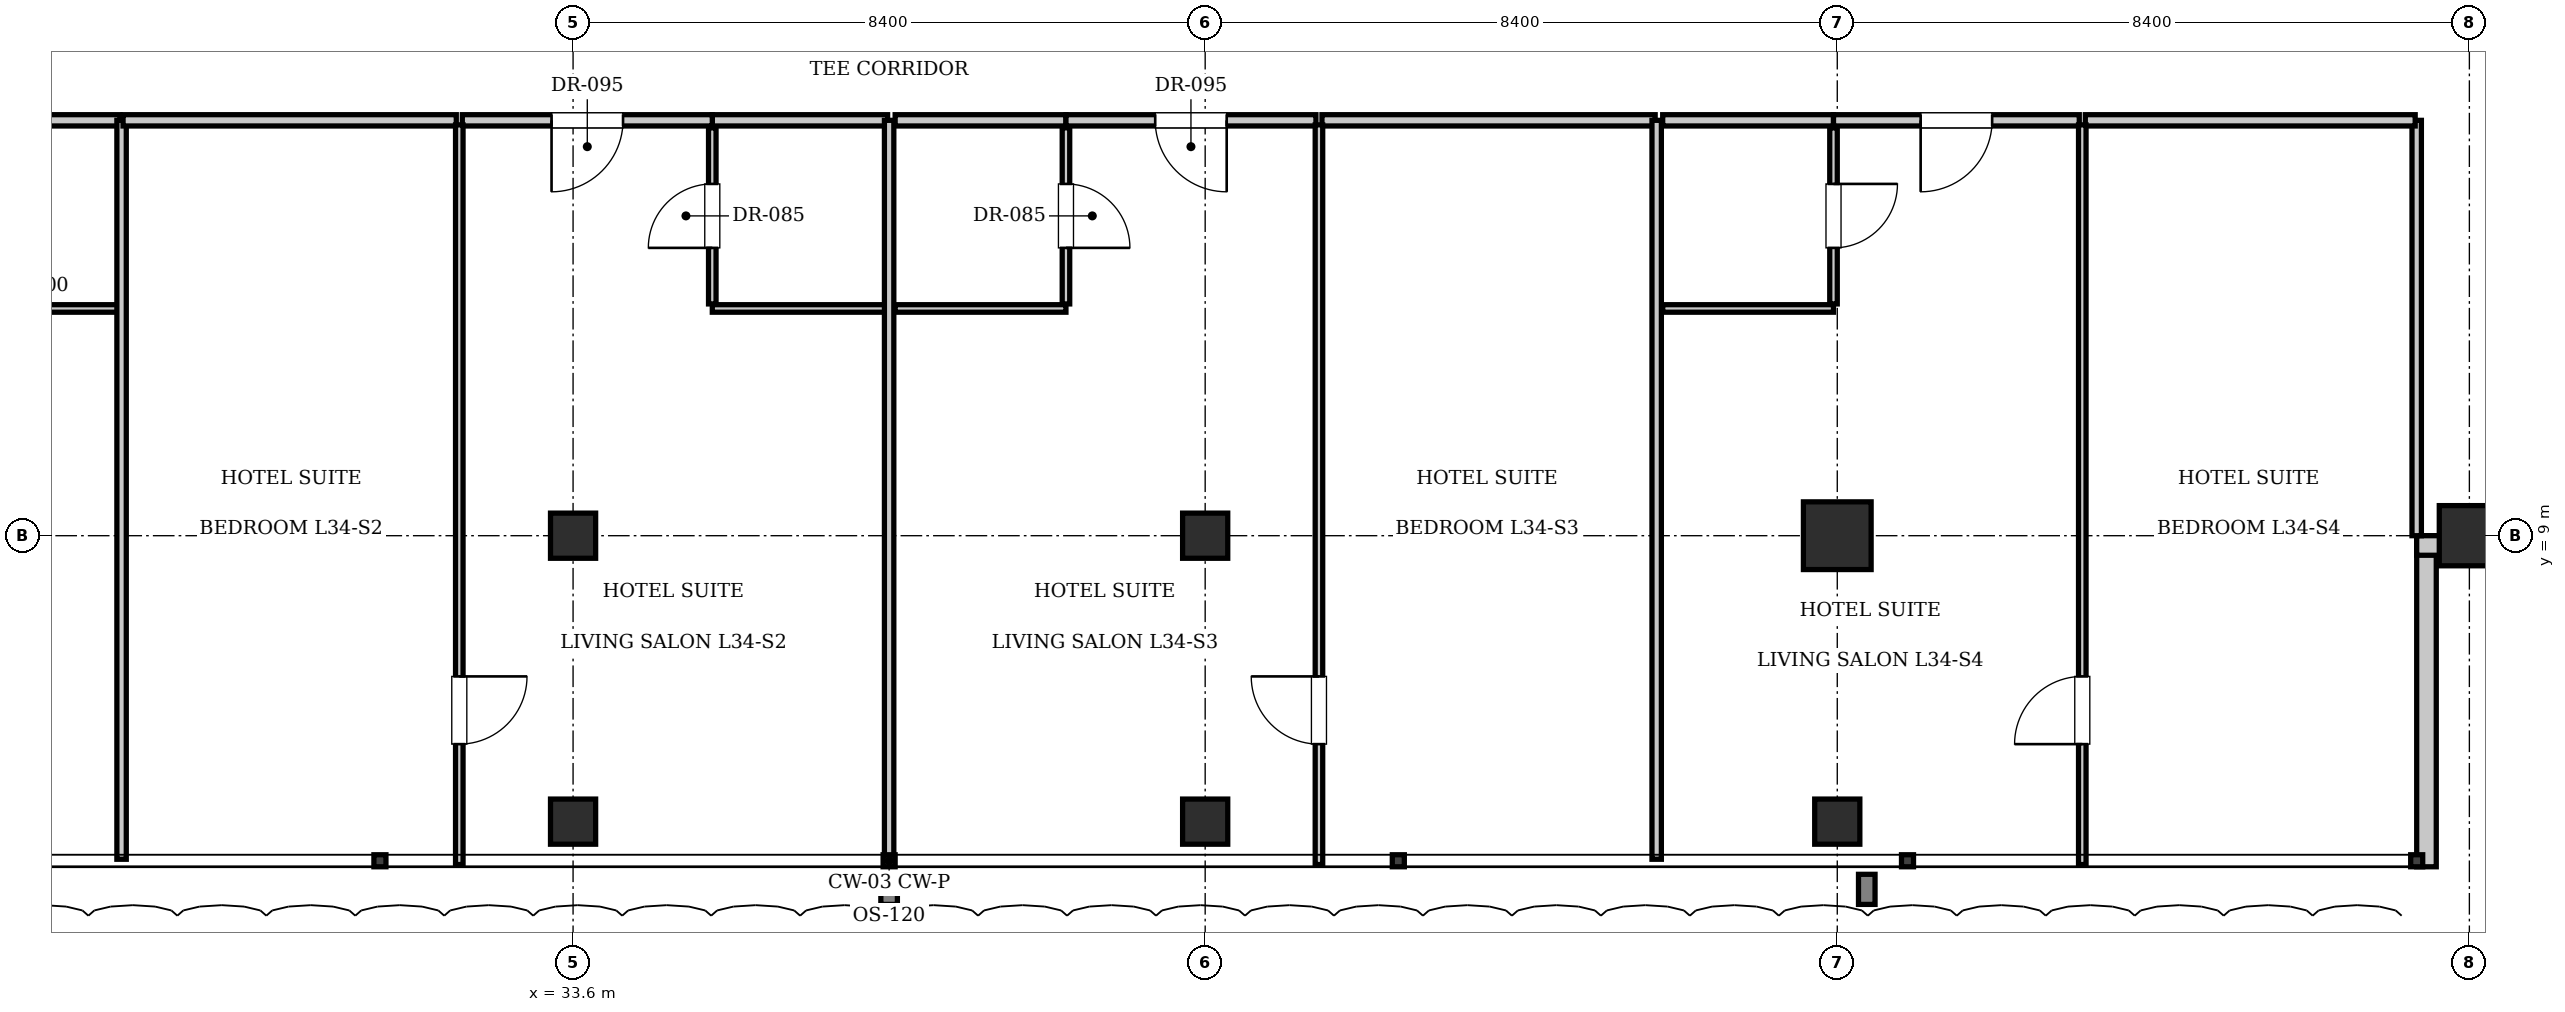
"""IFC4 building model, lengths in metres.
Left out: names, types, materials, properties, quantities, classifications, styles, units other than length and angle.
Written with IfcOpenShell. Run it as: python <this file> out.ifc"""

import sys

from ifc_helpers import new_model, si_unit, direction, frame, frame_2d, origin, origin_2d, place, context, subcontext, project, spatial, rectangle, i_section, extrude, element, fill, save


model = new_model("IFC4")
c1 = context("Model", 3, precision=1e-05, world=origin(), true_north=direction((0.0, 1.0)))
c2 = subcontext(c1, "Body", "Model", "MODEL_VIEW")
j1 = project(units=[si_unit("LENGTHUNIT", "METRE"), si_unit("PLANEANGLEUNIT", "RADIAN")], contexts=[c1])
p1 = place(None, origin())
s1 = spatial("IfcSite", under=j1, at=p1, CompositionType="ELEMENT")
p2 = place(p1, origin())
s2 = spatial("IfcBuilding", under=s1, at=p2, CompositionType="ELEMENT")
p3 = place(p2, frame((0.0, 0.0, 142.8)))
s3 = spatial("IfcBuildingStorey", under=s2, at=p3, CompositionType="ELEMENT", Elevation=142.8)
p4 = place(p3, frame((50.4, 9.0, 0.0), z_axis=(0.0, 0.0, 1.0), x_axis=(1.0, 0.0, 0.0)))
e1 = element("IfcColumn", 1, at=p4, inside=s3, PredefinedType="COLUMN", context=c2, shape_type="SweptSolid", body=[
    extrude(rectangle(XDim=0.9, YDim=0.9, at=origin_2d()), origin(), (0.0, 0.0, 1.0), 3.85),
])
for number, where, z_axis, x_axis in (
    (2, (33.6, 9.0, 0.0), (0.0, 0.0, 1.0), (1.0, 0.0, 0.0)),
    (3, (42.0, 9.0, 0.0), (0.0, 0.0, 1.0), (1.0, 0.0, 0.0)),
):
    element("IfcColumn", number, at=place(p3, frame(where, z_axis=z_axis, x_axis=x_axis)), inside=s3, PredefinedType="COLUMN", context=c2, shape_type="SweptSolid", body=[
        extrude(i_section(OverallWidth=0.6, OverallDepth=0.6, WebThickness=0.025, FlangeThickness=0.038, at=origin_2d()), origin(), (0.0, 0.0, 1.0), 3.85),
    ])
p5 = place(p3, frame((58.8, 9.0, 0.0), z_axis=(0.0, 0.0, 1.0), x_axis=(1.0, 0.0, 0.0)))
e4 = element("IfcColumn", 4, at=p5, inside=s3, PredefinedType="COLUMN", context=c2, shape_type="SweptSolid", body=[
    extrude(rectangle(XDim=0.8, YDim=0.8, at=origin_2d()), origin(), (0.0, 0.0, 1.0), 3.85),
])
for number, where, z_axis, x_axis in (
    (5, (33.6, 5.2, 0.0), (0.0, 0.0, 1.0), (1.0, 0.0, 0.0)),
    (6, (42.0, 5.2, 0.0), (0.0, 0.0, 1.0), (1.0, 0.0, 0.0)),
    (7, (50.4, 5.2, 0.0), (0.0, 0.0, 1.0), (1.0, 0.0, 0.0)),
):
    element("IfcColumn", number, at=place(p3, frame(where, z_axis=z_axis, x_axis=x_axis)), inside=s3, PredefinedType="COLUMN", context=c2, shape_type="SweptSolid", body=[
        extrude(i_section(OverallWidth=0.6, OverallDepth=0.6, WebThickness=0.025, FlangeThickness=0.038, at=origin_2d()), origin(), (0.0, 0.0, 1.0), 3.85),
    ])
p6 = place(p3, frame((58.23, 9.0, 0.0), z_axis=(0.0, 0.0, 1.0), x_axis=(0.0, -1.0, 0.0)))
e8 = element("IfcWall", 8, at=p6, inside=s3, PredefinedType="SOLIDWALL", context=c2, shape_type="SweptSolid", body=[
    extrude(rectangle(XDim=4.4, YDim=0.26, at=frame_2d((2.2, 0.0))), origin(), (0.0, 0.0, 1.0), 3.61),
])
p7 = place(p3, frame((62.5, 8.87, 0.0), z_axis=(0.0, 0.0, 1.0), x_axis=(-1.0, 0.0, 0.0)))
e9 = element("IfcWall", 9, at=p7, inside=s3, PredefinedType="SOLIDWALL", context=c2, shape_type="SweptSolid", body=[
    extrude(rectangle(XDim=4.4, YDim=0.26, at=frame_2d((2.2, 0.0))), origin(), (0.0, 0.0, 1.0), 2.998),
])
p8 = place(p3, frame((58.1, 9.0, 0.0), z_axis=(0.0, 0.0, 1.0), x_axis=(0.0, 1.0, 0.0)))
e10 = element("IfcWall", 10, at=p8, inside=s3, PredefinedType="PARTITIONING", context=c2, shape_type="SweptSolid", body=[
    extrude(rectangle(XDim=5.52, YDim=0.125, at=frame_2d((2.76, 0.0))), origin(), (0.0, 0.0, 1.0), 3.61),
])
p9 = place(p3, frame((25.25, 14.52, 0.0), z_axis=(0.0, 0.0, 1.0), x_axis=(1.0, 0.0, 0.0)))
e11 = element("IfcWall", 11, at=p9, inside=s3, PredefinedType="PARTITIONING", context=c2, shape_type="SweptSolid", body=[
    extrude(rectangle(XDim=2.33, YDim=0.15, at=frame_2d((1.165, 0.0))), origin(), (0.0, 0.0, 1.0), 3.61),
])
p10 = place(p3, frame((25.25, 12.02, 0.0), z_axis=(0.0, 0.0, 1.0), x_axis=(1.0, 0.0, 0.0)))
e12 = element("IfcWall", 12, at=p10, inside=s3, PredefinedType="PARTITIONING", context=c2, shape_type="SweptSolid", body=[
    extrude(rectangle(XDim=2.31, YDim=0.1, at=frame_2d((1.155, 0.0))), origin(), (0.0, 0.0, 1.0), 3.61),
])
p11 = place(p3, frame((27.6, 4.7, 0.0), z_axis=(0.0, 0.0, 1.0), x_axis=(0.0, 1.0, 0.0)))
e13 = element("IfcWall", 13, at=p11, inside=s3, PredefinedType="PARTITIONING", context=c2, shape_type="SweptSolid", body=[
    extrude(rectangle(XDim=9.82, YDim=0.125, at=frame_2d((4.91, 0.0))), origin(), (0.0, 0.0, 1.0), 3.61),
])
p12 = place(p3, frame((35.45, 14.52, 0.0), z_axis=(0.0, 0.0, 1.0), x_axis=(1.0, 0.0, 0.0)))
e14 = element("IfcWall", 14, at=p12, inside=s3, PredefinedType="PARTITIONING", context=c2, shape_type="SweptSolid", body=[
    extrude(rectangle(XDim=2.33, YDim=0.15, at=frame_2d((1.165, 0.0))), origin(), (0.0, 0.0, 1.0), 3.61),
])
p13 = place(p3, frame((35.45, 12.02, 0.0), z_axis=(0.0, 0.0, 1.0), x_axis=(1.0, 0.0, 0.0)))
e15 = element("IfcWall", 15, at=p13, inside=s3, PredefinedType="PARTITIONING", context=c2, shape_type="SweptSolid", body=[
    extrude(rectangle(XDim=2.31, YDim=0.1, at=frame_2d((1.155, 0.0))), origin(), (0.0, 0.0, 1.0), 3.61),
])
p14 = place(p3, frame((35.45, 12.08, 0.0), z_axis=(0.0, 0.0, 1.0), x_axis=(0.0, 1.0, 0.0)))
e16 = element("IfcWall", 16, at=p14, inside=s3, PredefinedType="PARTITIONING", context=c2, shape_type="SweptSolid", body=[
    extrude(rectangle(XDim=2.34, YDim=0.1, at=frame_2d((1.17, 0.0))), origin(), (0.0, 0.0, 1.0), 3.61),
])
p15 = place(p14, frame((0.745, 0.0, 0.0)))
e17 = element("IfcOpeningElement", 17, at=p15, cuts=e16, PredefinedType="OPENING", context=c2, shape_type="SweptSolid", body=[
    extrude(rectangle(XDim=0.85, YDim=2.1, at=frame_2d((0.425, 1.05))), frame((0.0, 0.06, 0.0), z_axis=(0.0, -1.0, 0.0), x_axis=(1.0, 0.0, 0.0)), (0.0, 0.0, 1.0), 0.12),
])
p16 = place(p3, frame((27.62, 14.52, 0.0), z_axis=(0.0, 0.0, 1.0), x_axis=(1.0, 0.0, 0.0)))
e18 = element("IfcWall", 18, at=p16, inside=s3, PredefinedType="PARTITIONING", context=c2, shape_type="SweptSolid", body=[
    extrude(rectangle(XDim=4.428, YDim=0.15, at=frame_2d((2.214, 0.0))), origin(), (0.0, 0.0, 1.0), 3.61),
])
p17 = place(p3, frame((32.128, 14.52, 0.0), z_axis=(0.0, 0.0, 1.0), x_axis=(1.0, 0.0, 0.0)))
e19 = element("IfcWall", 19, at=p17, inside=s3, PredefinedType="PARTITIONING", context=c2, shape_type="SweptSolid", body=[
    extrude(rectangle(XDim=3.322, YDim=0.15, at=frame_2d((1.661, 0.0))), origin(), (0.0, 0.0, 1.0), 3.61),
])
p18 = place(p17, frame((1.186, 0.0, 0.0)))
e20 = element("IfcOpeningElement", 20, at=p18, cuts=e19, PredefinedType="OPENING", context=c2, shape_type="SweptSolid", body=[
    extrude(rectangle(XDim=0.95, YDim=2.15, at=frame_2d((0.475, 1.075))), frame((0.0, 0.085, 0.0), z_axis=(0.0, -1.0, 0.0), x_axis=(1.0, 0.0, 0.0)), (0.0, 0.0, 1.0), 0.17),
])
p19 = place(p3, frame((32.088, 4.63, 0.0), z_axis=(0.0, 0.0, 1.0), x_axis=(0.0, 1.0, 0.0)))
e21 = element("IfcWall", 21, at=p19, inside=s3, PredefinedType="PARTITIONING", context=c2, shape_type="SweptSolid", body=[
    extrude(rectangle(XDim=9.83, YDim=0.1, at=frame_2d((4.915, 0.0))), origin(), (0.0, 0.0, 1.0), 3.61),
])
p20 = place(p19, frame((1.6, 0.0, 0.0)))
e22 = element("IfcOpeningElement", 22, at=p20, cuts=e21, PredefinedType="OPENING", context=c2, shape_type="SweptSolid", body=[
    extrude(rectangle(XDim=0.9, YDim=2.1, at=frame_2d((0.45, 1.05))), frame((0.0, 0.06, 0.0), z_axis=(0.0, -1.0, 0.0), x_axis=(1.0, 0.0, 0.0)), (0.0, 0.0, 1.0), 0.12),
])
p21 = place(p3, frame((37.8, 4.7, 0.0), z_axis=(0.0, 0.0, 1.0), x_axis=(0.0, 1.0, 0.0)))
e23 = element("IfcWall", 23, at=p21, inside=s3, PredefinedType="PARTITIONING", context=c2, shape_type="SweptSolid", body=[
    extrude(rectangle(XDim=9.82, YDim=0.125, at=frame_2d((4.91, 0.0))), origin(), (0.0, 0.0, 1.0), 3.255),
])
p22 = place(p3, frame((37.88, 14.52, 0.0), z_axis=(0.0, 0.0, 1.0), x_axis=(1.0, 0.0, 0.0)))
e24 = element("IfcWall", 24, at=p22, inside=s3, PredefinedType="PARTITIONING", context=c2, shape_type="SweptSolid", body=[
    extrude(rectangle(XDim=2.27, YDim=0.15, at=frame_2d((1.135, 0.0))), origin(), (0.0, 0.0, 1.0), 3.61),
])
p23 = place(p3, frame((37.88, 12.02, 0.0), z_axis=(0.0, 0.0, 1.0), x_axis=(1.0, 0.0, 0.0)))
e25 = element("IfcWall", 25, at=p23, inside=s3, PredefinedType="PARTITIONING", context=c2, shape_type="SweptSolid", body=[
    extrude(rectangle(XDim=2.27, YDim=0.1, at=frame_2d((1.135, 0.0))), origin(), (0.0, 0.0, 1.0), 3.61),
])
p24 = place(p3, frame((40.15, 12.08, 0.0), z_axis=(0.0, 0.0, 1.0), x_axis=(0.0, 1.0, 0.0)))
e26 = element("IfcWall", 26, at=p24, inside=s3, PredefinedType="PARTITIONING", context=c2, shape_type="SweptSolid", body=[
    extrude(rectangle(XDim=2.34, YDim=0.1, at=frame_2d((1.17, 0.0))), origin(), (0.0, 0.0, 1.0), 3.61),
])
p25 = place(p24, frame((0.745, 0.0, 0.0)))
e27 = element("IfcOpeningElement", 27, at=p25, cuts=e26, PredefinedType="OPENING", context=c2, shape_type="SweptSolid", body=[
    extrude(rectangle(XDim=0.85, YDim=2.1, at=frame_2d((0.425, 1.05))), frame((0.0, 0.06, 0.0), z_axis=(0.0, -1.0, 0.0), x_axis=(1.0, 0.0, 0.0)), (0.0, 0.0, 1.0), 0.12),
])
p26 = place(p3, frame((40.15, 14.52, 0.0), z_axis=(0.0, 0.0, 1.0), x_axis=(1.0, 0.0, 0.0)))
e28 = element("IfcWall", 28, at=p26, inside=s3, PredefinedType="PARTITIONING", context=c2, shape_type="SweptSolid", body=[
    extrude(rectangle(XDim=3.322, YDim=0.15, at=frame_2d((1.661, 0.0))), origin(), (0.0, 0.0, 1.0), 3.61),
])
p27 = place(p26, frame((1.186, 0.0, 0.0)))
e29 = element("IfcOpeningElement", 29, at=p27, cuts=e28, PredefinedType="OPENING", context=c2, shape_type="SweptSolid", body=[
    extrude(rectangle(XDim=0.95, YDim=2.15, at=frame_2d((0.475, 1.075))), frame((0.0, 0.085, 0.0), z_axis=(0.0, -1.0, 0.0), x_axis=(1.0, 0.0, 0.0)), (0.0, 0.0, 1.0), 0.17),
])
p28 = place(p3, frame((43.552, 14.52, 0.0), z_axis=(0.0, 0.0, 1.0), x_axis=(1.0, 0.0, 0.0)))
e30 = element("IfcWall", 30, at=p28, inside=s3, PredefinedType="PARTITIONING", context=c2, shape_type="SweptSolid", body=[
    extrude(rectangle(XDim=4.428, YDim=0.15, at=frame_2d((2.214, 0.0))), origin(), (0.0, 0.0, 1.0), 3.61),
])
p29 = place(p3, frame((43.512, 4.63, 0.0), z_axis=(0.0, 0.0, 1.0), x_axis=(0.0, 1.0, 0.0)))
e31 = element("IfcWall", 31, at=p29, inside=s3, PredefinedType="PARTITIONING", context=c2, shape_type="SweptSolid", body=[
    extrude(rectangle(XDim=9.83, YDim=0.1, at=frame_2d((4.915, 0.0))), origin(), (0.0, 0.0, 1.0), 3.61),
])
p30 = place(p29, frame((1.6, 0.0, 0.0)))
e32 = element("IfcOpeningElement", 32, at=p30, cuts=e31, PredefinedType="OPENING", context=c2, shape_type="SweptSolid", body=[
    extrude(rectangle(XDim=0.9, YDim=2.1, at=frame_2d((0.45, 1.05))), frame((0.0, 0.06, 0.0), z_axis=(0.0, -1.0, 0.0), x_axis=(1.0, 0.0, 0.0)), (0.0, 0.0, 1.0), 0.12),
])
p31 = place(p3, frame((48.0, 4.7, 0.0), z_axis=(0.0, 0.0, 1.0), x_axis=(0.0, 1.0, 0.0)))
e33 = element("IfcWall", 33, at=p31, inside=s3, PredefinedType="PARTITIONING", context=c2, shape_type="SweptSolid", body=[
    extrude(rectangle(XDim=9.82, YDim=0.125, at=frame_2d((4.91, 0.0))), origin(), (0.0, 0.0, 1.0), 3.61),
])
p32 = place(p3, frame((48.08, 14.52, 0.0), z_axis=(0.0, 0.0, 1.0), x_axis=(1.0, 0.0, 0.0)))
e34 = element("IfcWall", 34, at=p32, inside=s3, PredefinedType="PARTITIONING", context=c2, shape_type="SweptSolid", body=[
    extrude(rectangle(XDim=2.27, YDim=0.15, at=frame_2d((1.135, 0.0))), origin(), (0.0, 0.0, 1.0), 3.61),
])
p33 = place(p3, frame((48.08, 12.02, 0.0), z_axis=(0.0, 0.0, 1.0), x_axis=(1.0, 0.0, 0.0)))
e35 = element("IfcWall", 35, at=p33, inside=s3, PredefinedType="PARTITIONING", context=c2, shape_type="SweptSolid", body=[
    extrude(rectangle(XDim=2.27, YDim=0.1, at=frame_2d((1.135, 0.0))), origin(), (0.0, 0.0, 1.0), 3.61),
])
p34 = place(p3, frame((50.35, 12.08, 0.0), z_axis=(0.0, 0.0, 1.0), x_axis=(0.0, 1.0, 0.0)))
e36 = element("IfcWall", 36, at=p34, inside=s3, PredefinedType="PARTITIONING", context=c2, shape_type="SweptSolid", body=[
    extrude(rectangle(XDim=2.34, YDim=0.1, at=frame_2d((1.17, 0.0))), origin(), (0.0, 0.0, 1.0), 2.998),
])
p35 = place(p34, frame((0.745, 0.0, 0.0)))
e37 = element("IfcOpeningElement", 37, at=p35, cuts=e36, PredefinedType="OPENING", context=c2, shape_type="SweptSolid", body=[
    extrude(rectangle(XDim=0.85, YDim=2.1, at=frame_2d((0.425, 1.05))), frame((0.0, 0.06, 0.0), z_axis=(0.0, -1.0, 0.0), x_axis=(1.0, 0.0, 0.0)), (0.0, 0.0, 1.0), 0.12),
])
p36 = place(p3, frame((50.35, 14.52, 0.0), z_axis=(0.0, 0.0, 1.0), x_axis=(1.0, 0.0, 0.0)))
e38 = element("IfcWall", 38, at=p36, inside=s3, PredefinedType="PARTITIONING", context=c2, shape_type="SweptSolid", body=[
    extrude(rectangle(XDim=3.266, YDim=0.15, at=frame_2d((1.633, 0.0))), origin(), (0.0, 0.0, 1.0), 3.61),
])
p37 = place(p36, frame((1.158, 0.0, 0.0)))
e39 = element("IfcOpeningElement", 39, at=p37, cuts=e38, PredefinedType="OPENING", context=c2, shape_type="SweptSolid", body=[
    extrude(rectangle(XDim=0.95, YDim=2.15, at=frame_2d((0.475, 1.075))), frame((0.0, 0.085, 0.0), z_axis=(0.0, -1.0, 0.0), x_axis=(1.0, 0.0, 0.0)), (0.0, 0.0, 1.0), 0.17),
])
p38 = place(p3, frame((53.696, 14.52, 0.0), z_axis=(0.0, 0.0, 1.0), x_axis=(1.0, 0.0, 0.0)))
e40 = element("IfcWall", 40, at=p38, inside=s3, PredefinedType="PARTITIONING", context=c2, shape_type="SweptSolid", body=[
    extrude(rectangle(XDim=4.384, YDim=0.15, at=frame_2d((2.192, 0.0))), origin(), (0.0, 0.0, 1.0), 3.61),
])
p39 = place(p3, frame((53.656, 4.63, 0.0), z_axis=(0.0, 0.0, 1.0), x_axis=(0.0, 1.0, 0.0)))
e41 = element("IfcWall", 41, at=p39, inside=s3, PredefinedType="PARTITIONING", context=c2, shape_type="SweptSolid", body=[
    extrude(rectangle(XDim=9.83, YDim=0.1, at=frame_2d((4.915, 0.0))), origin(), (0.0, 0.0, 1.0), 3.61),
])
p40 = place(p39, frame((1.6, 0.0, 0.0)))
e42 = element("IfcOpeningElement", 42, at=p40, cuts=e41, PredefinedType="OPENING", context=c2, shape_type="SweptSolid", body=[
    extrude(rectangle(XDim=0.9, YDim=2.1, at=frame_2d((0.45, 1.05))), frame((0.0, 0.06, 0.0), z_axis=(0.0, -1.0, 0.0), x_axis=(1.0, 0.0, 0.0)), (0.0, 0.0, 1.0), 0.12),
])
p41 = place(p15, origin())
e43 = element("IfcDoor", 43, at=p41, inside=s3, OperationType="SINGLE_SWING_LEFT", PredefinedType="DOOR", context=c2, shape_type="SweptSolid", body=[
    extrude(rectangle(XDim=0.85, YDim=2.1, at=frame_2d((0.425, 1.05))), frame((0.0, 0.025, 0.0), z_axis=(0.0, -1.0, 0.0), x_axis=(1.0, 0.0, 0.0)), (0.0, 0.0, 1.0), 0.05),
])
fill(e17, e43)
p42 = place(p18, frame((0.95, 0.0, 0.0), z_axis=(0.0, 0.0, 1.0), x_axis=(-1.0, 0.0, 0.0)))
e44 = element("IfcDoor", 44, at=p42, inside=s3, OperationType="SINGLE_SWING_RIGHT", PredefinedType="DOOR", context=c2, shape_type="SweptSolid", body=[
    extrude(rectangle(XDim=0.95, YDim=2.15, at=frame_2d((0.475, 1.075))), frame((0.0, 0.025, 0.0), z_axis=(0.0, -1.0, 0.0), x_axis=(1.0, 0.0, 0.0)), (0.0, 0.0, 1.0), 0.05),
])
fill(e20, e44)
p43 = place(p20, frame((0.9, 0.0, 0.0), z_axis=(0.0, 0.0, 1.0), x_axis=(-1.0, 0.0, 0.0)))
e45 = element("IfcDoor", 45, at=p43, inside=s3, OperationType="SINGLE_SWING_LEFT", PredefinedType="DOOR", context=c2, shape_type="SweptSolid", body=[
    extrude(rectangle(XDim=0.9, YDim=2.1, at=frame_2d((0.45, 1.05))), frame((0.0, 0.025, 0.0), z_axis=(0.0, -1.0, 0.0), x_axis=(1.0, 0.0, 0.0)), (0.0, 0.0, 1.0), 0.05),
])
fill(e22, e45)
p44 = place(p25, frame((0.85, 0.0, 0.0), z_axis=(0.0, 0.0, 1.0), x_axis=(-1.0, 0.0, 0.0)))
e46 = element("IfcDoor", 46, at=p44, inside=s3, OperationType="SINGLE_SWING_RIGHT", PredefinedType="DOOR", context=c2, shape_type="SweptSolid", body=[
    extrude(rectangle(XDim=0.85, YDim=2.1, at=frame_2d((0.425, 1.05))), frame((0.0, 0.025, 0.0), z_axis=(0.0, -1.0, 0.0), x_axis=(1.0, 0.0, 0.0)), (0.0, 0.0, 1.0), 0.05),
])
fill(e27, e46)
p45 = place(p27, frame((0.95, 0.0, 0.0), z_axis=(0.0, 0.0, 1.0), x_axis=(-1.0, 0.0, 0.0)))
e47 = element("IfcDoor", 47, at=p45, inside=s3, OperationType="SINGLE_SWING_LEFT", PredefinedType="DOOR", context=c2, shape_type="SweptSolid", body=[
    extrude(rectangle(XDim=0.95, YDim=2.15, at=frame_2d((0.475, 1.075))), frame((0.0, 0.025, 0.0), z_axis=(0.0, -1.0, 0.0), x_axis=(1.0, 0.0, 0.0)), (0.0, 0.0, 1.0), 0.05),
])
fill(e29, e47)
p46 = place(p30, origin())
e48 = element("IfcDoor", 48, at=p46, inside=s3, OperationType="SINGLE_SWING_RIGHT", PredefinedType="DOOR", context=c2, shape_type="SweptSolid", body=[
    extrude(rectangle(XDim=0.9, YDim=2.1, at=frame_2d((0.45, 1.05))), frame((0.0, 0.025, 0.0), z_axis=(0.0, -1.0, 0.0), x_axis=(1.0, 0.0, 0.0)), (0.0, 0.0, 1.0), 0.05),
])
fill(e32, e48)
p47 = place(p35, frame((0.85, 0.0, 0.0), z_axis=(0.0, 0.0, 1.0), x_axis=(-1.0, 0.0, 0.0)))
e49 = element("IfcDoor", 49, at=p47, inside=s3, OperationType="SINGLE_SWING_LEFT", PredefinedType="DOOR", context=c2, shape_type="SweptSolid", body=[
    extrude(rectangle(XDim=0.85, YDim=2.1, at=frame_2d((0.425, 1.05))), frame((0.0, 0.025, 0.0), z_axis=(0.0, -1.0, 0.0), x_axis=(1.0, 0.0, 0.0)), (0.0, 0.0, 1.0), 0.05),
])
fill(e37, e49)
p48 = place(p37, frame((0.95, 0.0, 0.0), z_axis=(0.0, 0.0, 1.0), x_axis=(-1.0, 0.0, 0.0)))
e50 = element("IfcDoor", 50, at=p48, inside=s3, OperationType="SINGLE_SWING_RIGHT", PredefinedType="DOOR", context=c2, shape_type="SweptSolid", body=[
    extrude(rectangle(XDim=0.95, YDim=2.15, at=frame_2d((0.475, 1.075))), frame((0.0, 0.025, 0.0), z_axis=(0.0, -1.0, 0.0), x_axis=(1.0, 0.0, 0.0)), (0.0, 0.0, 1.0), 0.05),
])
fill(e39, e50)
p49 = place(p40, origin())
e51 = element("IfcDoor", 51, at=p49, inside=s3, OperationType="SINGLE_SWING_LEFT", PredefinedType="DOOR", context=c2, shape_type="SweptSolid", body=[
    extrude(rectangle(XDim=0.9, YDim=2.1, at=frame_2d((0.45, 1.05))), frame((0.0, 0.025, 0.0), z_axis=(0.0, -1.0, 0.0), x_axis=(1.0, 0.0, 0.0)), (0.0, 0.0, 1.0), 0.05),
])
fill(e42, e51)
save(model, sys.argv[1])
